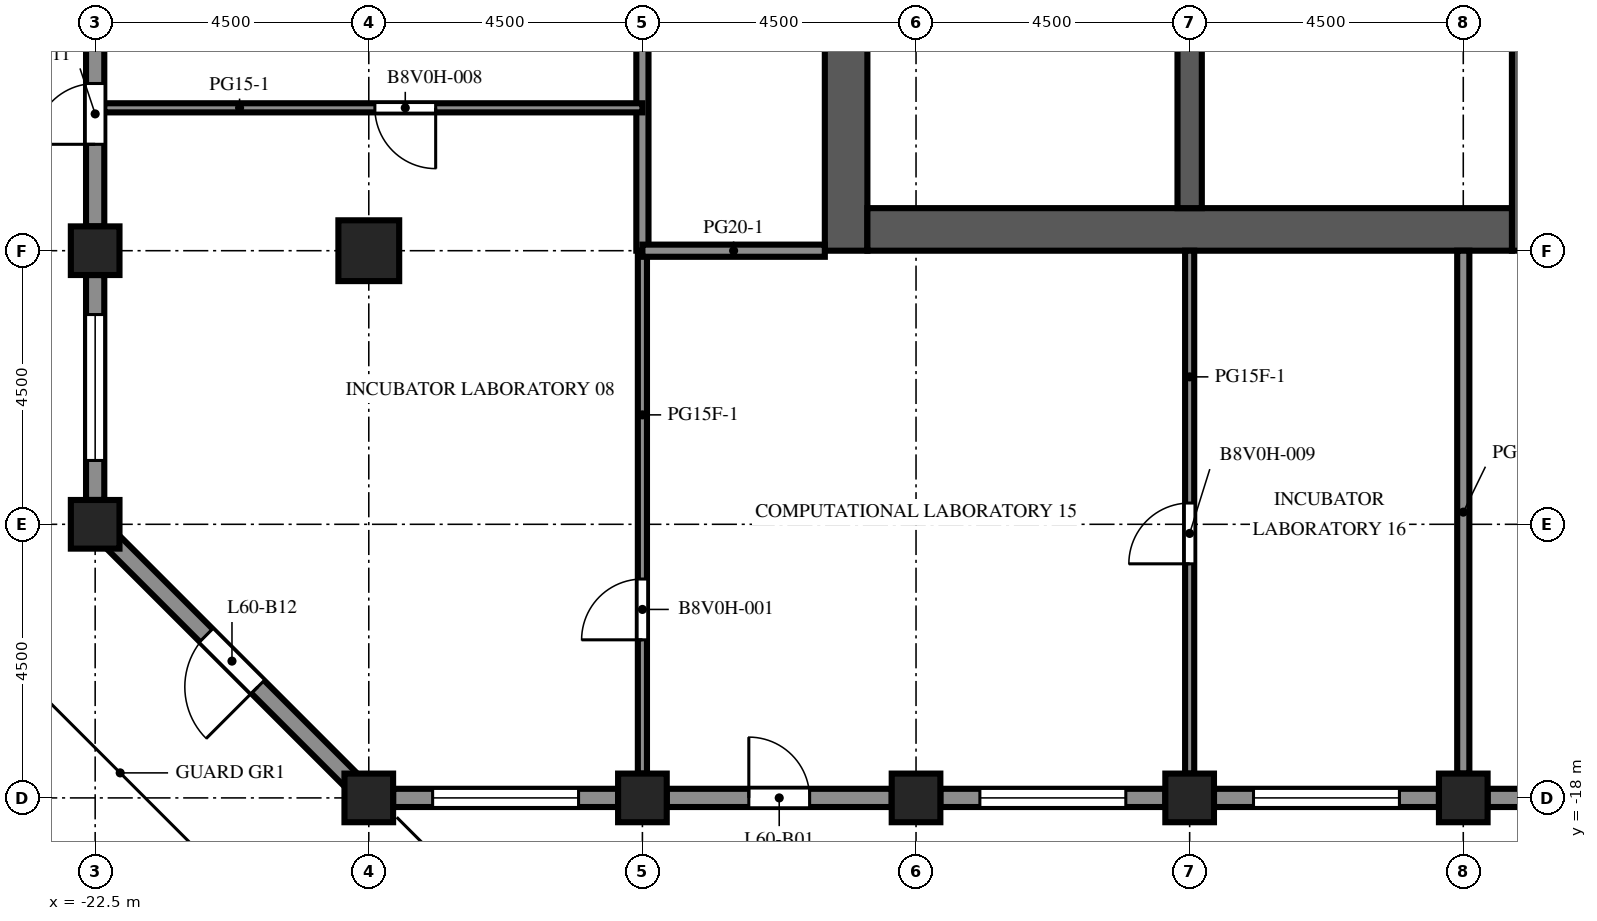
"""IFC4 building model, lengths in metres.
Left out: names, types, materials, properties, quantities, classifications, styles, units other than length and angle.
Written with IfcOpenShell. Run it as: python <this file> out.ifc"""

import sys

from ifc_helpers import new_model, si_unit, direction, frame, frame_2d, origin, origin_2d, place, context, subcontext, project, spatial, rectangle, extrude, element, fill, save


model = new_model("IFC4")
c1 = context("Model", 3, precision=1e-05, world=origin(), true_north=direction((0.0, 1.0)))
c2 = subcontext(c1, "Body", "Model", "MODEL_VIEW")
j1 = project(units=[si_unit("LENGTHUNIT", "METRE"), si_unit("PLANEANGLEUNIT", "RADIAN")], contexts=[c1])
p1 = place(None, origin())
s1 = spatial("IfcSite", under=j1, at=p1, CompositionType="ELEMENT")
p2 = place(p1, origin())
s2 = spatial("IfcBuilding", under=s1, at=p2, CompositionType="ELEMENT")
p3 = place(p2, frame((0.0, 0.0, 266.3)))
s3 = spatial("IfcBuildingStorey", under=s2, at=p3, CompositionType="ELEMENT", Elevation=266.3)
for number, where, z_axis, x_axis in (
    (1, (-22.5, -13.5, -0.45), (0.0, 0.0, 1.0), (1.0, 0.0, 0.0)),
    (2, (-22.5, -9.0, -0.45), (0.0, 0.0, 1.0), (1.0, 0.0, 0.0)),
    (3, (-18.0, -18.0, -0.45), (0.0, 0.0, 1.0), (1.0, 0.0, 0.0)),
    (4, (-13.5, -18.0, -0.45), (0.0, 0.0, 1.0), (1.0, 0.0, 0.0)),
    (5, (-9.0, -18.0, -0.45), (0.0, 0.0, 1.0), (1.0, 0.0, 0.0)),
    (6, (-4.5, -18.0, -0.45), (0.0, 0.0, 1.0), (1.0, 0.0, 0.0)),
    (7, (0.0, -18.0, -0.45), (0.0, 0.0, 1.0), (1.0, 0.0, 0.0)),
):
    element("IfcColumn", number, at=place(p3, frame(where, z_axis=z_axis, x_axis=x_axis)), inside=s3, PredefinedType="COLUMN", context=c2, shape_type="SweptSolid", body=[
        extrude(rectangle(XDim=0.8, YDim=0.8, at=origin_2d()), origin(), (0.0, 0.0, 1.0), 4.55),
    ])
p4 = place(p3, frame((-18.0, -9.0, -0.45), z_axis=(0.0, 0.0, 1.0), x_axis=(1.0, 0.0, 0.0)))
e8 = element("IfcColumn", 8, at=p4, inside=s3, PredefinedType="COLUMN", context=c2, shape_type="SweptSolid", body=[
    extrude(rectangle(XDim=1.0, YDim=1.0, at=origin_2d()), origin(), (0.0, 0.0, 1.0), 4.55),
])
p5 = place(p3, frame((-10.15, -9.0, 0.0), z_axis=(0.0, 0.0, 1.0), x_axis=(0.0, 1.0, 0.0)))
e9 = element("IfcWall", 9, at=p5, inside=s3, PredefinedType="SHEAR", context=c2, shape_type="SweptSolid", body=[
    extrude(rectangle(XDim=27.5, YDim=0.7, at=frame_2d((13.75, 0.0))), origin(), (0.0, 0.0, 1.0), 4.1),
])
p6 = place(p5, frame((12.55, 0.0, 0.0)))
e10 = element("IfcOpeningElement", 10, at=p6, cuts=e9, PredefinedType="OPENING", context=c2, shape_type="SweptSolid", body=[
    extrude(rectangle(XDim=2.4, YDim=2.4, at=frame_2d((1.2, 1.2))), frame((0.0, 0.36, 0.0), z_axis=(0.0, -1.0, 0.0), x_axis=(1.0, 0.0, 0.0)), (0.0, 0.0, 1.0), 0.72),
])
p7 = place(p5, frame((6.825, 0.0, 0.0)))
e11 = element("IfcOpeningElement", 11, at=p7, cuts=e9, PredefinedType="OPENING", context=c2, shape_type="SweptSolid", body=[
    extrude(rectangle(XDim=1.2, YDim=2.1, at=frame_2d((0.6, 1.05))), frame((0.0, 0.36, 0.0), z_axis=(0.0, -1.0, 0.0), x_axis=(1.0, 0.0, 0.0)), (0.0, 0.0, 1.0), 0.72),
])
p8 = place(p5, frame((19.475, 0.0, 0.0)))
e12 = element("IfcOpeningElement", 12, at=p8, cuts=e9, PredefinedType="OPENING", context=c2, shape_type="SweptSolid", body=[
    extrude(rectangle(XDim=1.2, YDim=2.1, at=frame_2d((0.6, 1.05))), frame((0.0, 0.36, 0.0), z_axis=(0.0, -1.0, 0.0), x_axis=(1.0, 0.0, 0.0)), (0.0, 0.0, 1.0), 0.72),
])
p9 = place(p3, frame((1.15, -9.0, 0.0), z_axis=(0.0, 0.0, 1.0), x_axis=(0.0, 1.0, 0.0)))
e13 = element("IfcWall", 13, at=p9, inside=s3, PredefinedType="SHEAR", context=c2, shape_type="SweptSolid", body=[
    extrude(rectangle(XDim=27.5, YDim=0.7, at=frame_2d((13.75, 0.0))), origin(), (0.0, 0.0, 1.0), 4.1),
])
p10 = place(p9, frame((12.55, 0.0, 0.0)))
e14 = element("IfcOpeningElement", 14, at=p10, cuts=e13, PredefinedType="OPENING", context=c2, shape_type="SweptSolid", body=[
    extrude(rectangle(XDim=2.4, YDim=2.4, at=frame_2d((1.2, 1.2))), frame((0.0, 0.36, 0.0), z_axis=(0.0, -1.0, 0.0), x_axis=(1.0, 0.0, 0.0)), (0.0, 0.0, 1.0), 0.72),
])
p11 = place(p9, frame((3.788, 0.0, 0.0)))
e15 = element("IfcOpeningElement", 15, at=p11, cuts=e13, PredefinedType="OPENING", context=c2, shape_type="SweptSolid", body=[
    extrude(rectangle(XDim=0.968, YDim=2.1, at=frame_2d((0.484, 1.05))), frame((0.0, 0.36, 0.0), z_axis=(0.0, -1.0, 0.0), x_axis=(1.0, 0.0, 0.0)), (0.0, 0.0, 1.0), 0.72),
])
p12 = place(p9, frame((23.54, 0.0, 0.0)))
e16 = element("IfcOpeningElement", 16, at=p12, cuts=e13, PredefinedType="OPENING", context=c2, shape_type="SweptSolid", body=[
    extrude(rectangle(XDim=1.2, YDim=2.1, at=frame_2d((0.6, 1.05))), frame((0.0, 0.36, 0.0), z_axis=(0.0, -1.0, 0.0), x_axis=(1.0, 0.0, 0.0)), (0.0, 0.0, 1.0), 0.72),
])
p13 = place(p3, frame((-9.8, -8.65, 0.0), z_axis=(0.0, 0.0, 1.0), x_axis=(1.0, 0.0, 0.0)))
e17 = element("IfcWall", 17, at=p13, inside=s3, PredefinedType="SHEAR", context=c2, shape_type="SweptSolid", body=[
    extrude(rectangle(XDim=10.6, YDim=0.7, at=frame_2d((5.3, 0.0))), origin(), (0.0, 0.0, 1.0), 4.1),
])
p14 = place(p3, frame((-4.5, -8.3, 0.0), z_axis=(0.0, 0.0, 1.0), x_axis=(0.0, 1.0, 0.0)))
e18 = element("IfcWall", 18, at=p14, inside=s3, PredefinedType="SHEAR", context=c2, shape_type="SweptSolid", body=[
    extrude(rectangle(XDim=7.6, YDim=0.4, at=frame_2d((3.8, 0.0))), origin(), (0.0, 0.0, 1.0), 4.1),
])
p15 = place(p3, frame((-13.9, -18.0, 0.0), z_axis=(0.0, 0.0, 1.0), x_axis=(-1.0, 0.0, 0.0)))
e19 = element("IfcWall", 19, at=p15, inside=s3, PredefinedType="SOLIDWALL", context=c2, shape_type="SweptSolid", body=[
    extrude(rectangle(XDim=3.7, YDim=0.3, at=frame_2d((1.85, 0.0))), origin(), (0.0, 0.0, 1.0), 2.85),
])
p16 = place(p15, frame((0.65, 0.0, 0.8)))
e20 = element("IfcOpeningElement", 20, at=p16, cuts=e19, PredefinedType="OPENING", context=c2, shape_type="SweptSolid", body=[
    extrude(rectangle(XDim=2.4, YDim=1.7, at=frame_2d((1.2, 0.85))), frame((0.0, 0.16, 0.0), z_axis=(0.0, -1.0, 0.0), x_axis=(1.0, 0.0, 0.0)), (0.0, 0.0, 1.0), 0.32),
])
p17 = place(p3, frame((-9.4, -18.0, 0.0), z_axis=(0.0, 0.0, 1.0), x_axis=(-1.0, 0.0, 0.0)))
e21 = element("IfcWall", 21, at=p17, inside=s3, PredefinedType="SOLIDWALL", context=c2, shape_type="SweptSolid", body=[
    extrude(rectangle(XDim=3.7, YDim=0.3, at=frame_2d((1.85, 0.0))), origin(), (0.0, 0.0, 1.0), 2.85),
])
p18 = place(p17, frame((1.35, 0.0, 0.0)))
e22 = element("IfcOpeningElement", 22, at=p18, cuts=e21, PredefinedType="OPENING", context=c2, shape_type="SweptSolid", body=[
    extrude(rectangle(XDim=1.0, YDim=2.2, at=frame_2d((0.5, 1.1))), frame((0.0, 0.16, 0.0), z_axis=(0.0, -1.0, 0.0), x_axis=(1.0, 0.0, 0.0)), (0.0, 0.0, 1.0), 0.32),
])
p19 = place(p3, frame((-4.9, -18.0, 0.0), z_axis=(0.0, 0.0, 1.0), x_axis=(-1.0, 0.0, 0.0)))
e23 = element("IfcWall", 23, at=p19, inside=s3, PredefinedType="SOLIDWALL", context=c2, shape_type="SweptSolid", body=[
    extrude(rectangle(XDim=3.7, YDim=0.3, at=frame_2d((1.85, 0.0))), origin(), (0.0, 0.0, 1.0), 2.85),
])
p20 = place(p19, frame((0.65, 0.0, 0.8)))
e24 = element("IfcOpeningElement", 24, at=p20, cuts=e23, PredefinedType="OPENING", context=c2, shape_type="SweptSolid", body=[
    extrude(rectangle(XDim=2.4, YDim=1.7, at=frame_2d((1.2, 0.85))), frame((0.0, 0.16, 0.0), z_axis=(0.0, -1.0, 0.0), x_axis=(1.0, 0.0, 0.0)), (0.0, 0.0, 1.0), 0.32),
])
p21 = place(p3, frame((-0.4, -18.0, 0.0), z_axis=(0.0, 0.0, 1.0), x_axis=(-1.0, 0.0, 0.0)))
e25 = element("IfcWall", 25, at=p21, inside=s3, PredefinedType="SOLIDWALL", context=c2, shape_type="SweptSolid", body=[
    extrude(rectangle(XDim=3.7, YDim=0.3, at=frame_2d((1.85, 0.0))), origin(), (0.0, 0.0, 1.0), 2.85),
])
p22 = place(p21, frame((0.65, 0.0, 0.8)))
e26 = element("IfcOpeningElement", 26, at=p22, cuts=e25, PredefinedType="OPENING", context=c2, shape_type="SweptSolid", body=[
    extrude(rectangle(XDim=2.4, YDim=1.7, at=frame_2d((1.2, 0.85))), frame((0.0, 0.16, 0.0), z_axis=(0.0, -1.0, 0.0), x_axis=(1.0, 0.0, 0.0)), (0.0, 0.0, 1.0), 0.32),
])
p23 = place(p3, frame((4.1, -18.0, 0.0), z_axis=(0.0, 0.0, 1.0), x_axis=(-1.0, 0.0, 0.0)))
e27 = element("IfcWall", 27, at=p23, inside=s3, PredefinedType="SOLIDWALL", context=c2, shape_type="SweptSolid", body=[
    extrude(rectangle(XDim=3.7, YDim=0.3, at=frame_2d((1.85, 0.0))), origin(), (0.0, 0.0, 1.0), 2.85),
])
p24 = place(p23, frame((0.65, 0.0, 0.8)))
e28 = element("IfcOpeningElement", 28, at=p24, cuts=e27, PredefinedType="OPENING", context=c2, shape_type="SweptSolid", body=[
    extrude(rectangle(XDim=2.4, YDim=1.7, at=frame_2d((1.2, 0.85))), frame((0.0, 0.16, 0.0), z_axis=(0.0, -1.0, 0.0), x_axis=(1.0, 0.0, 0.0)), (0.0, 0.0, 1.0), 0.32),
])
p25 = place(p3, frame((-22.5, -8.6, 0.0), z_axis=(0.0, 0.0, 1.0), x_axis=(0.0, 1.0, 0.0)))
e29 = element("IfcWall", 29, at=p25, inside=s3, PredefinedType="SOLIDWALL", context=c2, shape_type="SweptSolid", body=[
    extrude(rectangle(XDim=3.7, YDim=0.3, at=frame_2d((1.85, 0.0))), origin(), (0.0, 0.0, 1.0), 2.85),
])
p26 = place(p25, frame((1.35, 0.0, 0.0)))
e30 = element("IfcOpeningElement", 30, at=p26, cuts=e29, PredefinedType="OPENING", context=c2, shape_type="SweptSolid", body=[
    extrude(rectangle(XDim=1.0, YDim=2.2, at=frame_2d((0.5, 1.1))), frame((0.0, 0.16, 0.0), z_axis=(0.0, -1.0, 0.0), x_axis=(1.0, 0.0, 0.0)), (0.0, 0.0, 1.0), 0.32),
])
p27 = place(p3, frame((-22.5, -13.1, 0.0), z_axis=(0.0, 0.0, 1.0), x_axis=(0.0, 1.0, 0.0)))
e31 = element("IfcWall", 31, at=p27, inside=s3, PredefinedType="SOLIDWALL", context=c2, shape_type="SweptSolid", body=[
    extrude(rectangle(XDim=3.7, YDim=0.3, at=frame_2d((1.85, 0.0))), origin(), (0.0, 0.0, 1.0), 2.85),
])
p28 = place(p27, frame((0.65, 0.0, 0.8)))
e32 = element("IfcOpeningElement", 32, at=p28, cuts=e31, PredefinedType="OPENING", context=c2, shape_type="SweptSolid", body=[
    extrude(rectangle(XDim=2.4, YDim=1.7, at=frame_2d((1.2, 0.85))), frame((0.0, 0.16, 0.0), z_axis=(0.0, -1.0, 0.0), x_axis=(1.0, 0.0, 0.0)), (0.0, 0.0, 1.0), 0.32),
])
p29 = place(p3, frame((-18.294, -17.706, 0.0), z_axis=(0.0, 0.0, 1.0), x_axis=(-0.707106781187, 0.707106781187, 0.0)))
e33 = element("IfcWall", 33, at=p29, inside=s3, PredefinedType="SOLIDWALL", context=c2, shape_type="SweptSolid", body=[
    extrude(rectangle(XDim=5.532, YDim=0.3, at=frame_2d((2.766, 0.0))), origin(), (0.0, 0.0, 1.0), 2.85),
])
p30 = place(p29, frame((2.166, 0.0, 0.0)))
e34 = element("IfcOpeningElement", 34, at=p30, cuts=e33, PredefinedType="OPENING", context=c2, shape_type="SweptSolid", body=[
    extrude(rectangle(XDim=1.2, YDim=2.2, at=frame_2d((0.6, 1.1))), frame((0.0, 0.16, 0.0), z_axis=(0.0, -1.0, 0.0), x_axis=(1.0, 0.0, 0.0)), (0.0, 0.0, 1.0), 0.32),
])
p31 = place(p3, frame((-13.5, -9.0, 0.0), z_axis=(0.0, 0.0, 1.0), x_axis=(0.0, -1.0, 0.0)))
e35 = element("IfcWall", 35, at=p31, inside=s3, PredefinedType="PARTITIONING", context=c2, shape_type="SweptSolid", body=[
    extrude(rectangle(XDim=8.6, YDim=0.15, at=frame_2d((4.3, 0.0))), origin(), (0.0, 0.0, 1.0), 3.65),
])
p32 = place(p31, frame((5.4, 0.0, 0.0)))
e36 = element("IfcOpeningElement", 36, at=p32, cuts=e35, PredefinedType="OPENING", context=c2, shape_type="SweptSolid", body=[
    extrude(rectangle(XDim=1.0, YDim=2.1, at=frame_2d((0.5, 1.05))), frame((0.0, 0.085, 0.0), z_axis=(0.0, -1.0, 0.0), x_axis=(1.0, 0.0, 0.0)), (0.0, 0.0, 1.0), 0.17),
])
p33 = place(p3, frame((-13.5, -9.0, 0.0), z_axis=(0.0, 0.0, 1.0), x_axis=(0.0, 1.0, 0.0)))
e37 = element("IfcWall", 37, at=p33, inside=s3, PredefinedType="PARTITIONING", context=c2, shape_type="SweptSolid", body=[
    extrude(rectangle(XDim=12.25, YDim=0.2, at=frame_2d((6.125, 0.0))), origin(), (0.0, 0.0, 1.0), 3.65),
])
p34 = place(p33, frame((7.2, 0.0, 0.0)))
e38 = element("IfcOpeningElement", 38, at=p34, cuts=e37, PredefinedType="OPENING", context=c2, shape_type="SweptSolid", body=[
    extrude(rectangle(XDim=1.0, YDim=2.1, at=frame_2d((0.5, 1.05))), frame((0.0, 0.11, 0.0), z_axis=(0.0, -1.0, 0.0), x_axis=(1.0, 0.0, 0.0)), (0.0, 0.0, 1.0), 0.22),
])
p35 = place(p3, frame((-4.5, -9.0, 0.0), z_axis=(0.0, 0.0, 1.0), x_axis=(0.0, -1.0, 0.0)))
e39 = element("IfcWall", 39, at=p35, inside=s3, PredefinedType="PARTITIONING", context=c2, shape_type="SweptSolid", body=[
    extrude(rectangle(XDim=8.6, YDim=0.15, at=frame_2d((4.3, 0.0))), origin(), (0.0, 0.0, 1.0), 3.65),
])
p36 = place(p35, frame((4.15, 0.0, 0.0)))
e40 = element("IfcOpeningElement", 40, at=p36, cuts=e39, PredefinedType="OPENING", context=c2, shape_type="SweptSolid", body=[
    extrude(rectangle(XDim=1.0, YDim=2.1, at=frame_2d((0.5, 1.05))), frame((0.0, 0.085, 0.0), z_axis=(0.0, -1.0, 0.0), x_axis=(1.0, 0.0, 0.0)), (0.0, 0.0, 1.0), 0.17),
])
p37 = place(p3, frame((0.0, -17.6, 0.0), z_axis=(0.0, 0.0, 1.0), x_axis=(0.0, 1.0, 0.0)))
e41 = element("IfcWall", 41, at=p37, inside=s3, PredefinedType="PARTITIONING", context=c2, shape_type="SweptSolid", body=[
    extrude(rectangle(XDim=8.6, YDim=0.2, at=frame_2d((4.3, 0.0))), origin(), (0.0, 0.0, 1.0), 3.65),
])
p38 = place(p3, frame((-13.5, -9.0, 0.0), z_axis=(0.0, 0.0, 1.0), x_axis=(1.0, 0.0, 0.0)))
e42 = element("IfcWall", 42, at=p38, inside=s3, PredefinedType="PARTITIONING", context=c2, shape_type="SweptSolid", body=[
    extrude(rectangle(XDim=3.0, YDim=0.2, at=frame_2d((1.5, 0.0))), origin(), (0.0, 0.0, 1.0), 3.65),
])
p39 = place(p3, frame((-13.5, -6.65, 0.0), z_axis=(0.0, 0.0, 1.0), x_axis=(-1.0, 0.0, 0.0)))
e43 = element("IfcWall", 43, at=p39, inside=s3, PredefinedType="PARTITIONING", context=c2, shape_type="SweptSolid", body=[
    extrude(rectangle(XDim=8.85, YDim=0.15, at=frame_2d((4.425, 0.0))), origin(), (0.0, 0.0, 1.0), 3.65),
])
p40 = place(p39, frame((3.4, 0.0, 0.0)))
e44 = element("IfcOpeningElement", 44, at=p40, cuts=e43, PredefinedType="OPENING", context=c2, shape_type="SweptSolid", body=[
    extrude(rectangle(XDim=1.0, YDim=2.1, at=frame_2d((0.5, 1.05))), frame((0.0, 0.085, 0.0), z_axis=(0.0, -1.0, 0.0), x_axis=(1.0, 0.0, 0.0)), (0.0, 0.0, 1.0), 0.17),
])
p41 = place(p16, origin())
e45 = element("IfcWindow", 45, at=p41, inside=s3, PartitioningType="SINGLE_PANEL", PredefinedType="WINDOW", context=c2, shape_type="SweptSolid", body=[
    extrude(rectangle(XDim=2.4, YDim=1.7, at=frame_2d((1.2, 0.85))), frame((0.0, 0.03, 0.0), z_axis=(0.0, -1.0, 0.0), x_axis=(1.0, 0.0, 0.0)), (0.0, 0.0, 1.0), 0.06),
])
fill(e20, e45)
p42 = place(p18, origin())
e46 = element("IfcDoor", 46, at=p42, inside=s3, OperationType="SINGLE_SWING_RIGHT", PredefinedType="DOOR", context=c2, shape_type="SweptSolid", body=[
    extrude(rectangle(XDim=1.0, YDim=2.2, at=frame_2d((0.5, 1.1))), frame((0.0, 0.025, 0.0), z_axis=(0.0, -1.0, 0.0), x_axis=(1.0, 0.0, 0.0)), (0.0, 0.0, 1.0), 0.05),
])
fill(e22, e46)
p43 = place(p20, origin())
e47 = element("IfcWindow", 47, at=p43, inside=s3, PartitioningType="SINGLE_PANEL", PredefinedType="WINDOW", context=c2, shape_type="SweptSolid", body=[
    extrude(rectangle(XDim=2.4, YDim=1.7, at=frame_2d((1.2, 0.85))), frame((0.0, 0.03, 0.0), z_axis=(0.0, -1.0, 0.0), x_axis=(1.0, 0.0, 0.0)), (0.0, 0.0, 1.0), 0.06),
])
fill(e24, e47)
p44 = place(p22, origin())
e48 = element("IfcWindow", 48, at=p44, inside=s3, PartitioningType="SINGLE_PANEL", PredefinedType="WINDOW", context=c2, shape_type="SweptSolid", body=[
    extrude(rectangle(XDim=2.4, YDim=1.7, at=frame_2d((1.2, 0.85))), frame((0.0, 0.03, 0.0), z_axis=(0.0, -1.0, 0.0), x_axis=(1.0, 0.0, 0.0)), (0.0, 0.0, 1.0), 0.06),
])
fill(e26, e48)
p45 = place(p26, origin())
e49 = element("IfcDoor", 49, at=p45, inside=s3, OperationType="SINGLE_SWING_LEFT", PredefinedType="DOOR", context=c2, shape_type="SweptSolid", body=[
    extrude(rectangle(XDim=1.0, YDim=2.2, at=frame_2d((0.5, 1.1))), frame((0.0, 0.025, 0.0), z_axis=(0.0, -1.0, 0.0), x_axis=(1.0, 0.0, 0.0)), (0.0, 0.0, 1.0), 0.05),
])
fill(e30, e49)
p46 = place(p28, origin())
e50 = element("IfcWindow", 50, at=p46, inside=s3, PartitioningType="SINGLE_PANEL", PredefinedType="WINDOW", context=c2, shape_type="SweptSolid", body=[
    extrude(rectangle(XDim=2.4, YDim=1.7, at=frame_2d((1.2, 0.85))), frame((0.0, 0.03, 0.0), z_axis=(0.0, -1.0, 0.0), x_axis=(1.0, 0.0, 0.0)), (0.0, 0.0, 1.0), 0.06),
])
fill(e32, e50)
p47 = place(p30, origin())
e51 = element("IfcDoor", 51, at=p47, inside=s3, OperationType="SINGLE_SWING_LEFT", PredefinedType="DOOR", context=c2, shape_type="SweptSolid", body=[
    extrude(rectangle(XDim=1.2, YDim=2.2, at=frame_2d((0.6, 1.1))), frame((0.0, 0.025, 0.0), z_axis=(0.0, -1.0, 0.0), x_axis=(1.0, 0.0, 0.0)), (0.0, 0.0, 1.0), 0.05),
])
fill(e34, e51)
p48 = place(p32, origin())
e52 = element("IfcDoor", 52, at=p48, inside=s3, OperationType="SINGLE_SWING_RIGHT", PredefinedType="DOOR", context=c2, shape_type="SweptSolid", body=[
    extrude(rectangle(XDim=1.0, YDim=2.1, at=frame_2d((0.5, 1.05))), frame((0.0, 0.025, 0.0), z_axis=(0.0, -1.0, 0.0), x_axis=(1.0, 0.0, 0.0)), (0.0, 0.0, 1.0), 0.05),
])
fill(e36, e52)
p49 = place(p40, origin())
e53 = element("IfcDoor", 53, at=p49, inside=s3, OperationType="SINGLE_SWING_LEFT", PredefinedType="DOOR", context=c2, shape_type="SweptSolid", body=[
    extrude(rectangle(XDim=1.0, YDim=2.1, at=frame_2d((0.5, 1.05))), frame((0.0, 0.025, 0.0), z_axis=(0.0, -1.0, 0.0), x_axis=(1.0, 0.0, 0.0)), (0.0, 0.0, 1.0), 0.05),
])
fill(e44, e53)
p50 = place(p36, origin())
e54 = element("IfcDoor", 54, at=p50, inside=s3, OperationType="SINGLE_SWING_RIGHT", PredefinedType="DOOR", context=c2, shape_type="SweptSolid", body=[
    extrude(rectangle(XDim=1.0, YDim=2.1, at=frame_2d((0.5, 1.05))), frame((0.0, 0.025, 0.0), z_axis=(0.0, -1.0, 0.0), x_axis=(1.0, 0.0, 0.0)), (0.0, 0.0, 1.0), 0.05),
])
fill(e40, e54)
save(model, sys.argv[1])
